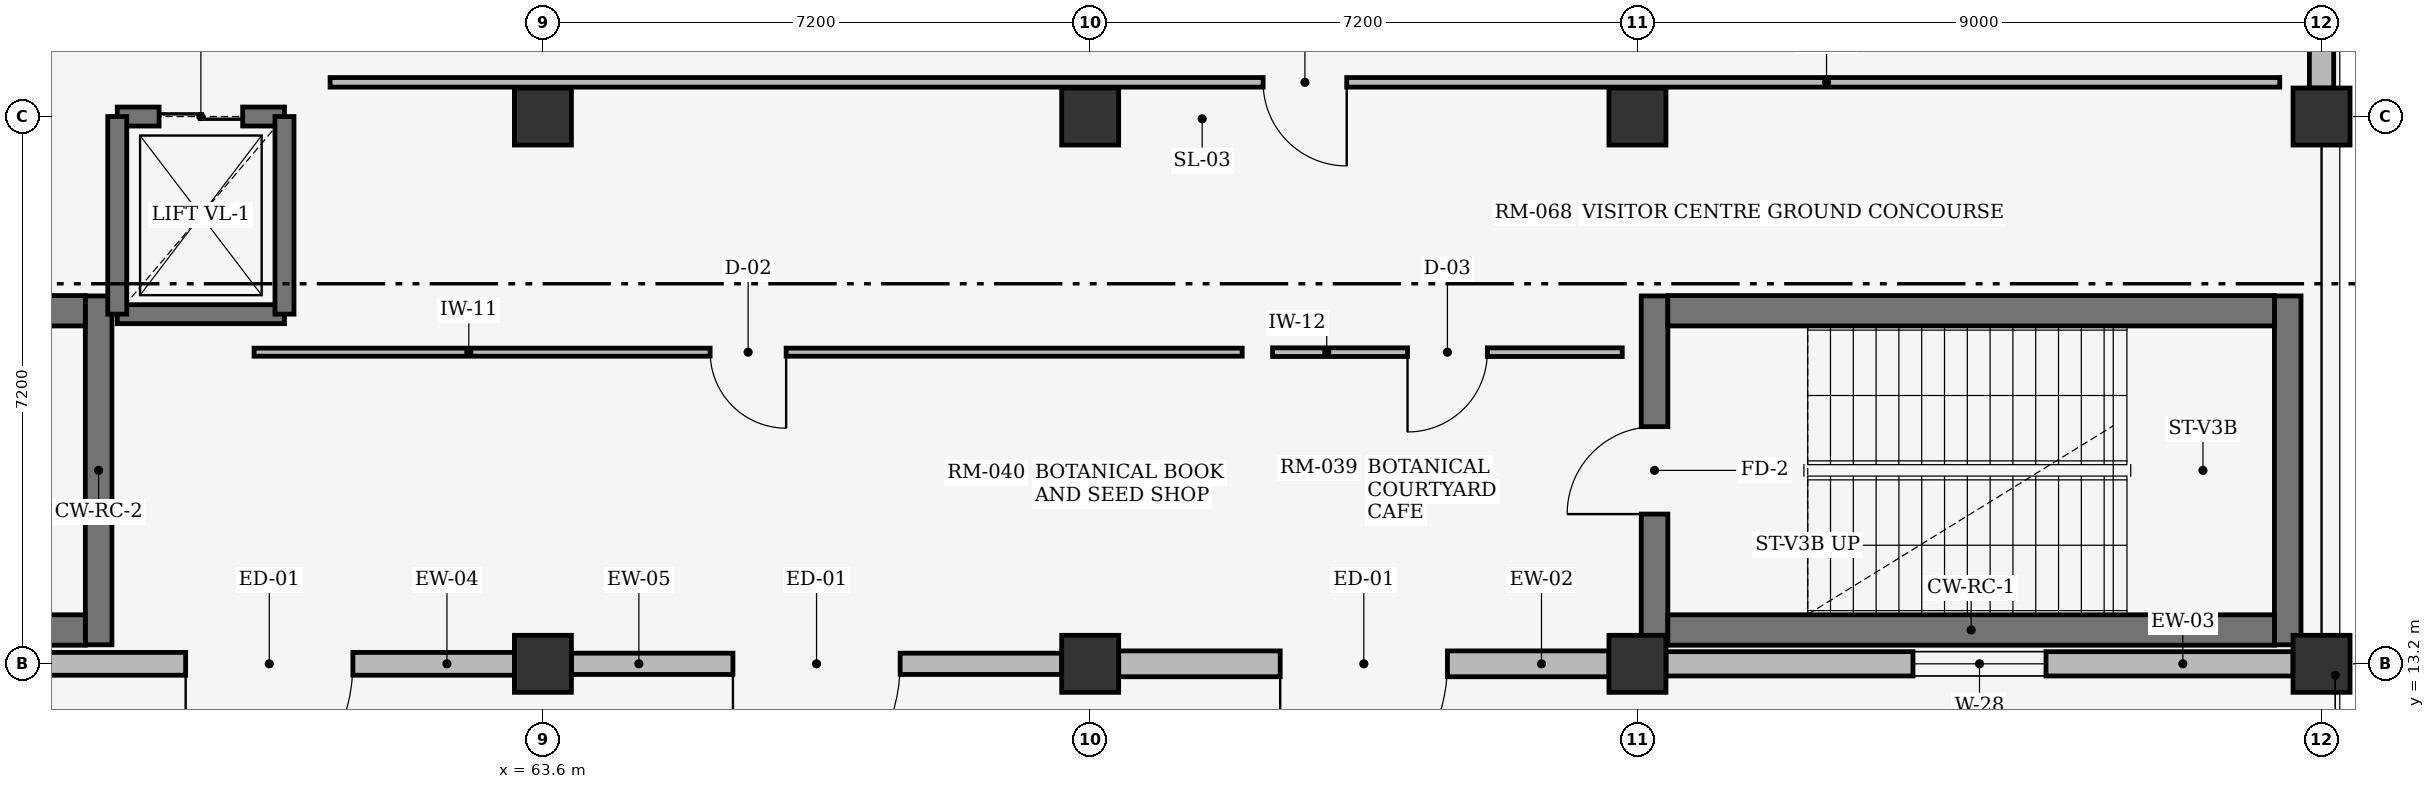
"""IFC4 building model, lengths in metres.
Left out: names, types, materials, properties, quantities, classifications, styles, units other than length and angle.
Written with IfcOpenShell. Run it as: python <this file> out.ifc"""

import sys

from ifc_helpers import new_model, si_unit, direction, frame, frame_2d, origin, origin_2d, place, context, subcontext, project, spatial, rectangle, extrude, element, fill, save


model = new_model("IFC4")
c1 = context("Model", 3, precision=1e-05, world=origin(), true_north=direction((0.0, 1.0)))
c2 = subcontext(c1, "Body", "Model", "MODEL_VIEW")
j1 = project(units=[si_unit("LENGTHUNIT", "METRE"), si_unit("PLANEANGLEUNIT", "RADIAN")], contexts=[c1])
p1 = place(None, origin())
s1 = spatial("IfcSite", under=j1, at=p1, CompositionType="ELEMENT")
p2 = place(p1, origin())
s2 = spatial("IfcBuilding", under=s1, at=p2, CompositionType="ELEMENT")
p3 = place(p2, origin())
s3 = spatial("IfcBuildingStorey", under=s2, at=p3, CompositionType="ELEMENT", Elevation=0.0)
for number, where, z_axis, x_axis in (
    (1, (63.6, 13.2, 0.0), (0.0, 0.0, 1.0), (1.0, 0.0, 0.0)),
    (2, (63.6, 20.4, 0.0), (0.0, 0.0, 1.0), (1.0, 0.0, 0.0)),
    (3, (70.8, 13.2, 0.0), (0.0, 0.0, 1.0), (1.0, 0.0, 0.0)),
    (4, (70.8, 20.4, 0.0), (0.0, 0.0, 1.0), (1.0, 0.0, 0.0)),
    (5, (78.0, 13.2, 0.0), (0.0, 0.0, 1.0), (1.0, 0.0, 0.0)),
    (6, (78.0, 20.4, 0.0), (0.0, 0.0, 1.0), (1.0, 0.0, 0.0)),
    (7, (87.0, 13.2, 0.0), (0.0, 0.0, 1.0), (1.0, 0.0, 0.0)),
    (8, (87.0, 20.4, 0.0), (0.0, 0.0, 1.0), (1.0, 0.0, 0.0)),
):
    element("IfcColumn", number, at=place(p3, frame(where, z_axis=z_axis, x_axis=x_axis)), inside=s3, PredefinedType="COLUMN", context=c2, shape_type="SweptSolid", body=[
        extrude(rectangle(XDim=0.75, YDim=0.75, at=origin_2d()), origin(), (0.0, 0.0, 1.0), 4.48),
    ])
p4 = place(p3, frame((56.775, 13.2, 0.0), z_axis=(0.0, 0.0, 1.0), x_axis=(1.0, 0.0, 0.0)))
e9 = element("IfcWall", 9, at=p4, inside=s3, PredefinedType="STANDARD", context=c2, shape_type="SweptSolid", body=[
    extrude(rectangle(XDim=6.45, YDim=0.3, at=frame_2d((3.225, 0.0))), origin(), (0.0, 0.0, 1.0), 3.97),
])
p5 = place(p4, frame((2.125, 0.0, 0.0)))
e10 = element("IfcOpeningElement", 10, at=p5, cuts=e9, PredefinedType="OPENING", context=c2, shape_type="SweptSolid", body=[
    extrude(rectangle(XDim=2.2, YDim=2.4, at=frame_2d((1.1, 1.2))), frame((0.0, 0.16, 0.0), z_axis=(0.0, -1.0, 0.0), x_axis=(1.0, 0.0, 0.0)), (0.0, 0.0, 1.0), 0.32),
])
p6 = place(p3, frame((63.975, 13.2, 0.0), z_axis=(0.0, 0.0, 1.0), x_axis=(1.0, 0.0, 0.0)))
e11 = element("IfcWall", 11, at=p6, inside=s3, PredefinedType="STANDARD", context=c2, shape_type="SweptSolid", body=[
    extrude(rectangle(XDim=6.45, YDim=0.28, at=frame_2d((3.225, 0.0))), origin(), (0.0, 0.0, 1.0), 3.97),
])
p7 = place(p6, frame((2.125, 0.0, 0.0)))
e12 = element("IfcOpeningElement", 12, at=p7, cuts=e11, PredefinedType="OPENING", context=c2, shape_type="SweptSolid", body=[
    extrude(rectangle(XDim=2.2, YDim=2.4, at=frame_2d((1.1, 1.2))), frame((0.0, 0.15, 0.0), z_axis=(0.0, -1.0, 0.0), x_axis=(1.0, 0.0, 0.0)), (0.0, 0.0, 1.0), 0.3),
])
p8 = place(p3, frame((71.175, 13.2, 0.0), z_axis=(0.0, 0.0, 1.0), x_axis=(1.0, 0.0, 0.0)))
e13 = element("IfcWall", 13, at=p8, inside=s3, PredefinedType="STANDARD", context=c2, shape_type="SweptSolid", body=[
    extrude(rectangle(XDim=6.45, YDim=0.34, at=frame_2d((3.225, 0.0))), origin(), (0.0, 0.0, 1.0), 3.97),
])
p9 = place(p8, frame((2.125, 0.0, 0.0)))
e14 = element("IfcOpeningElement", 14, at=p9, cuts=e13, PredefinedType="OPENING", context=c2, shape_type="SweptSolid", body=[
    extrude(rectangle(XDim=2.2, YDim=2.4, at=frame_2d((1.1, 1.2))), frame((0.0, 0.18, 0.0), z_axis=(0.0, -1.0, 0.0), x_axis=(1.0, 0.0, 0.0)), (0.0, 0.0, 1.0), 0.36),
])
p10 = place(p3, frame((78.375, 13.2, 0.0), z_axis=(0.0, 0.0, 1.0), x_axis=(1.0, 0.0, 0.0)))
e15 = element("IfcWall", 15, at=p10, inside=s3, PredefinedType="STANDARD", context=c2, shape_type="SweptSolid", body=[
    extrude(rectangle(XDim=8.25, YDim=0.32, at=frame_2d((4.125, 0.0))), origin(), (0.0, 0.0, 1.0), 3.97),
])
p11 = place(p10, frame((3.25, 0.0, 0.75)))
e16 = element("IfcOpeningElement", 16, at=p11, cuts=e15, PredefinedType="OPENING", context=c2, shape_type="SweptSolid", body=[
    extrude(rectangle(XDim=1.75, YDim=1.65, at=frame_2d((0.875, 0.825))), frame((0.0, 0.17, 0.0), z_axis=(0.0, -1.0, 0.0), x_axis=(1.0, 0.0, 0.0)), (0.0, 0.0, 1.0), 0.34),
])
p12 = place(p3, frame((87.0, 20.775, 0.0), z_axis=(0.0, 0.0, 1.0), x_axis=(0.0, 1.0, 0.0)))
e17 = element("IfcWall", 17, at=p12, inside=s3, PredefinedType="STANDARD", context=c2, shape_type="SweptSolid", body=[
    extrude(rectangle(XDim=6.45, YDim=0.32, at=frame_2d((3.225, 0.0))), origin(), (0.0, 0.0, 1.0), 3.97),
])
p13 = place(p3, frame((57.755, 13.45, 0.0), z_axis=(0.0, 0.0, 1.0), x_axis=(0.0, 1.0, 0.0)))
e18 = element("IfcWall", 18, at=p13, inside=s3, PredefinedType="SHEAR", context=c2, shape_type="SweptSolid", body=[
    extrude(rectangle(XDim=4.59, YDim=0.35, at=frame_2d((2.295, 0.0))), origin(), (0.0, 0.0, 1.0), 4.48),
])
for number, where, z_axis, x_axis in (
    (19, (49.6, 13.645, 0.0), (0.0, 0.0, 1.0), (1.0, 0.0, 0.0)),
    (20, (49.6, 17.845, 0.0), (0.0, 0.0, 1.0), (1.0, 0.0, 0.0)),
):
    element("IfcWall", number, at=place(p3, frame(where, z_axis=z_axis, x_axis=x_axis)), inside=s3, PredefinedType="SHEAR", context=c2, shape_type="SweptSolid", body=[
        extrude(rectangle(XDim=7.98, YDim=0.4, at=frame_2d((3.99, 0.0))), origin(), (0.0, 0.0, 1.0), 4.48),
    ])
p14 = place(p3, frame((78.225, 13.45, 0.0), z_axis=(0.0, 0.0, 1.0), x_axis=(0.0, 1.0, 0.0)))
e21 = element("IfcWall", 21, at=p14, inside=s3, PredefinedType="SHEAR", context=c2, shape_type="SweptSolid", body=[
    extrude(rectangle(XDim=4.59, YDim=0.35, at=frame_2d((2.295, 0.0))), origin(), (0.0, 0.0, 1.0), 4.48),
])
p15 = place(p14, frame((1.72, 0.0, 0.0)))
e22 = element("IfcOpeningElement", 22, at=p15, cuts=e21, PredefinedType="OPENING", context=c2, shape_type="SweptSolid", body=[
    extrude(rectangle(XDim=1.15, YDim=2.2, at=frame_2d((0.575, 1.1))), frame((0.0, 0.185, 0.0), z_axis=(0.0, -1.0, 0.0), x_axis=(1.0, 0.0, 0.0)), (0.0, 0.0, 1.0), 0.37),
])
p16 = place(p3, frame((86.555, 13.45, 0.0), z_axis=(0.0, 0.0, 1.0), x_axis=(0.0, 1.0, 0.0)))
e23 = element("IfcWall", 23, at=p16, inside=s3, PredefinedType="SHEAR", context=c2, shape_type="SweptSolid", body=[
    extrude(rectangle(XDim=4.59, YDim=0.35, at=frame_2d((2.295, 0.0))), origin(), (0.0, 0.0, 1.0), 4.48),
])
for number, where, z_axis, x_axis in (
    (24, (78.4, 13.645, 0.0), (0.0, 0.0, 1.0), (1.0, 0.0, 0.0)),
    (25, (78.4, 17.845, 0.0), (0.0, 0.0, 1.0), (1.0, 0.0, 0.0)),
):
    element("IfcWall", number, at=place(p3, frame(where, z_axis=z_axis, x_axis=x_axis)), inside=s3, PredefinedType="SHEAR", context=c2, shape_type="SweptSolid", body=[
        extrude(rectangle(XDim=7.98, YDim=0.4, at=frame_2d((3.99, 0.0))), origin(), (0.0, 0.0, 1.0), 4.48),
    ])
p17 = place(p3, frame((58.0, 17.8, 0.0), z_axis=(0.0, 0.0, 1.0), x_axis=(1.0, 0.0, 0.0)))
e26 = element("IfcWall", 26, at=p17, inside=s3, PredefinedType="SHEAR", context=c2, shape_type="SweptSolid", body=[
    extrude(rectangle(XDim=2.2, YDim=0.25, at=frame_2d((1.1, 0.0))), origin(), (0.0, 0.0, 1.0), 4.48),
])
p18 = place(p3, frame((58.0, 20.4, 0.0), z_axis=(0.0, 0.0, 1.0), x_axis=(1.0, 0.0, 0.0)))
e27 = element("IfcWall", 27, at=p18, inside=s3, PredefinedType="SHEAR", context=c2, shape_type="SweptSolid", body=[
    extrude(rectangle(XDim=2.2, YDim=0.25, at=frame_2d((1.1, 0.0))), origin(), (0.0, 0.0, 1.0), 4.48),
])
p19 = place(p18, frame((0.55, 0.0, 0.0)))
e28 = element("IfcOpeningElement", 28, at=p19, cuts=e27, PredefinedType="OPENING", context=c2, shape_type="SweptSolid", body=[
    extrude(rectangle(XDim=1.1, YDim=2.2, at=frame_2d((0.55, 1.1))), frame((0.0, 0.135, 0.0), z_axis=(0.0, -1.0, 0.0), x_axis=(1.0, 0.0, 0.0)), (0.0, 0.0, 1.0), 0.27),
])
for number, where, z_axis, x_axis in (
    (29, (58.0, 17.8, 0.0), (0.0, 0.0, 1.0), (0.0, 1.0, 0.0)),
    (30, (60.2, 17.8, 0.0), (0.0, 0.0, 1.0), (0.0, 1.0, 0.0)),
):
    element("IfcWall", number, at=place(p3, frame(where, z_axis=z_axis, x_axis=x_axis)), inside=s3, PredefinedType="SHEAR", context=c2, shape_type="SweptSolid", body=[
        extrude(rectangle(XDim=2.6, YDim=0.25, at=frame_2d((1.3, 0.0))), origin(), (0.0, 0.0, 1.0), 4.48),
    ])
p20 = place(p3, frame((59.8, 17.3, 0.0), z_axis=(0.0, 0.0, 1.0), x_axis=(1.0, 0.0, 0.0)))
e31 = element("IfcWall", 31, at=p20, inside=s3, PredefinedType="PARTITIONING", context=c2, shape_type="SweptSolid", body=[
    extrude(rectangle(XDim=13.0, YDim=0.106, at=frame_2d((6.5, 0.0))), origin(), (0.0, 0.0, 1.0), 4.46),
])
p21 = place(p20, frame((6.0, 0.0, 0.0)))
e32 = element("IfcOpeningElement", 32, at=p21, cuts=e31, PredefinedType="OPENING", context=c2, shape_type="SweptSolid", body=[
    extrude(rectangle(XDim=1.0, YDim=2.15, at=frame_2d((0.5, 1.075))), frame((0.0, 0.063, 0.0), z_axis=(0.0, -1.0, 0.0), x_axis=(1.0, 0.0, 0.0)), (0.0, 0.0, 1.0), 0.126),
])
p22 = place(p3, frame((73.2, 17.3, 0.0), z_axis=(0.0, 0.0, 1.0), x_axis=(1.0, 0.0, 0.0)))
e33 = element("IfcWall", 33, at=p22, inside=s3, PredefinedType="PARTITIONING", context=c2, shape_type="SweptSolid", body=[
    extrude(rectangle(XDim=4.6, YDim=0.114, at=frame_2d((2.3, 0.0))), origin(), (0.0, 0.0, 1.0), 4.46),
])
p23 = place(p22, frame((1.775, 0.0, 0.0)))
e34 = element("IfcOpeningElement", 34, at=p23, cuts=e33, PredefinedType="OPENING", context=c2, shape_type="SweptSolid", body=[
    extrude(rectangle(XDim=1.05, YDim=2.15, at=frame_2d((0.525, 1.075))), frame((0.0, 0.067, 0.0), z_axis=(0.0, -1.0, 0.0), x_axis=(1.0, 0.0, 0.0)), (0.0, 0.0, 1.0), 0.134),
])
p24 = place(p3, frame((60.8, 20.85, 0.0), z_axis=(0.0, 0.0, 1.0), x_axis=(1.0, 0.0, 0.0)))
e35 = element("IfcWall", 35, at=p24, inside=s3, PredefinedType="PARTITIONING", context=c2, shape_type="SweptSolid", body=[
    extrude(rectangle(XDim=25.65, YDim=0.126, at=frame_2d((12.825, 0.0))), origin(), (0.0, 0.0, 1.0), 4.46),
])
p25 = place(p24, frame((12.275, 0.0, 0.0)))
e36 = element("IfcOpeningElement", 36, at=p25, cuts=e35, PredefinedType="OPENING", context=c2, shape_type="SweptSolid", body=[
    extrude(rectangle(XDim=1.1, YDim=2.2, at=frame_2d((0.55, 1.1))), frame((0.0, 0.073, 0.0), z_axis=(0.0, -1.0, 0.0), x_axis=(1.0, 0.0, 0.0)), (0.0, 0.0, 1.0), 0.146),
])
p26 = place(p5, frame((2.2, 0.0, 0.0), z_axis=(0.0, 0.0, 1.0), x_axis=(-1.0, 0.0, 0.0)))
e37 = element("IfcDoor", 37, at=p26, inside=s3, OperationType="DOUBLE_DOOR_SINGLE_SWING", PredefinedType="DOOR", context=c2, shape_type="SweptSolid", body=[
    extrude(rectangle(XDim=2.2, YDim=2.4, at=frame_2d((1.1, 1.2))), frame((0.0, 0.025, 0.0), z_axis=(0.0, -1.0, 0.0), x_axis=(1.0, 0.0, 0.0)), (0.0, 0.0, 1.0), 0.05),
])
fill(e10, e37)
p27 = place(p7, frame((2.2, 0.0, 0.0), z_axis=(0.0, 0.0, 1.0), x_axis=(-1.0, 0.0, 0.0)))
e38 = element("IfcDoor", 38, at=p27, inside=s3, OperationType="DOUBLE_DOOR_SINGLE_SWING", PredefinedType="DOOR", context=c2, shape_type="SweptSolid", body=[
    extrude(rectangle(XDim=2.2, YDim=2.4, at=frame_2d((1.1, 1.2))), frame((0.0, 0.025, 0.0), z_axis=(0.0, -1.0, 0.0), x_axis=(1.0, 0.0, 0.0)), (0.0, 0.0, 1.0), 0.05),
])
fill(e12, e38)
p28 = place(p9, frame((2.2, 0.0, 0.0), z_axis=(0.0, 0.0, 1.0), x_axis=(-1.0, 0.0, 0.0)))
e39 = element("IfcDoor", 39, at=p28, inside=s3, OperationType="DOUBLE_DOOR_SINGLE_SWING", PredefinedType="DOOR", context=c2, shape_type="SweptSolid", body=[
    extrude(rectangle(XDim=2.2, YDim=2.4, at=frame_2d((1.1, 1.2))), frame((0.0, 0.025, 0.0), z_axis=(0.0, -1.0, 0.0), x_axis=(1.0, 0.0, 0.0)), (0.0, 0.0, 1.0), 0.05),
])
fill(e14, e39)
p29 = place(p11, origin())
e40 = element("IfcWindow", 40, at=p29, inside=s3, PartitioningType="SINGLE_PANEL", PredefinedType="WINDOW", context=c2, shape_type="SweptSolid", body=[
    extrude(rectangle(XDim=1.75, YDim=1.65, at=frame_2d((0.875, 0.825))), frame((0.0, 0.03, 0.0), z_axis=(0.0, -1.0, 0.0), x_axis=(1.0, 0.0, 0.0)), (0.0, 0.0, 1.0), 0.06),
])
fill(e16, e40)
p30 = place(p15, origin())
e41 = element("IfcDoor", 41, at=p30, inside=s3, OperationType="SINGLE_SWING_LEFT", PredefinedType="DOOR", context=c2, shape_type="SweptSolid", body=[
    extrude(rectangle(XDim=1.15, YDim=2.2, at=frame_2d((0.575, 1.1))), frame((0.0, 0.025, 0.0), z_axis=(0.0, -1.0, 0.0), x_axis=(1.0, 0.0, 0.0)), (0.0, 0.0, 1.0), 0.05),
])
fill(e22, e41)
p31 = place(p19, origin())
e42 = element("IfcDoor", 42, at=p31, inside=s3, OperationType="DOUBLE_DOOR_SLIDING", PredefinedType="DOOR", context=c2, shape_type="SweptSolid", body=[
    extrude(rectangle(XDim=1.1, YDim=2.2, at=frame_2d((0.55, 1.1))), frame((0.0, 0.025, 0.0), z_axis=(0.0, -1.0, 0.0), x_axis=(1.0, 0.0, 0.0)), (0.0, 0.0, 1.0), 0.05),
])
fill(e28, e42)
p32 = place(p21, origin())
e43 = element("IfcDoor", 43, at=p32, inside=s3, OperationType="SINGLE_SWING_RIGHT", PredefinedType="DOOR", context=c2, shape_type="SweptSolid", body=[
    extrude(rectangle(XDim=1.0, YDim=2.15, at=frame_2d((0.5, 1.075))), frame((0.0, 0.025, 0.0), z_axis=(0.0, -1.0, 0.0), x_axis=(1.0, 0.0, 0.0)), (0.0, 0.0, 1.0), 0.05),
])
fill(e32, e43)
p33 = place(p23, frame((1.05, 0.0, 0.0), z_axis=(0.0, 0.0, 1.0), x_axis=(-1.0, 0.0, 0.0)))
e44 = element("IfcDoor", 44, at=p33, inside=s3, OperationType="SINGLE_SWING_LEFT", PredefinedType="DOOR", context=c2, shape_type="SweptSolid", body=[
    extrude(rectangle(XDim=1.05, YDim=2.15, at=frame_2d((0.525, 1.075))), frame((0.0, 0.025, 0.0), z_axis=(0.0, -1.0, 0.0), x_axis=(1.0, 0.0, 0.0)), (0.0, 0.0, 1.0), 0.05),
])
fill(e34, e44)
p34 = place(p25, origin())
e45 = element("IfcDoor", 45, at=p34, inside=s3, OperationType="SINGLE_SWING_RIGHT", PredefinedType="DOOR", context=c2, shape_type="SweptSolid", body=[
    extrude(rectangle(XDim=1.1, YDim=2.2, at=frame_2d((0.55, 1.1))), frame((0.0, 0.025, 0.0), z_axis=(0.0, -1.0, 0.0), x_axis=(1.0, 0.0, 0.0)), (0.0, 0.0, 1.0), 0.05),
])
fill(e36, e45)
save(model, sys.argv[1])
